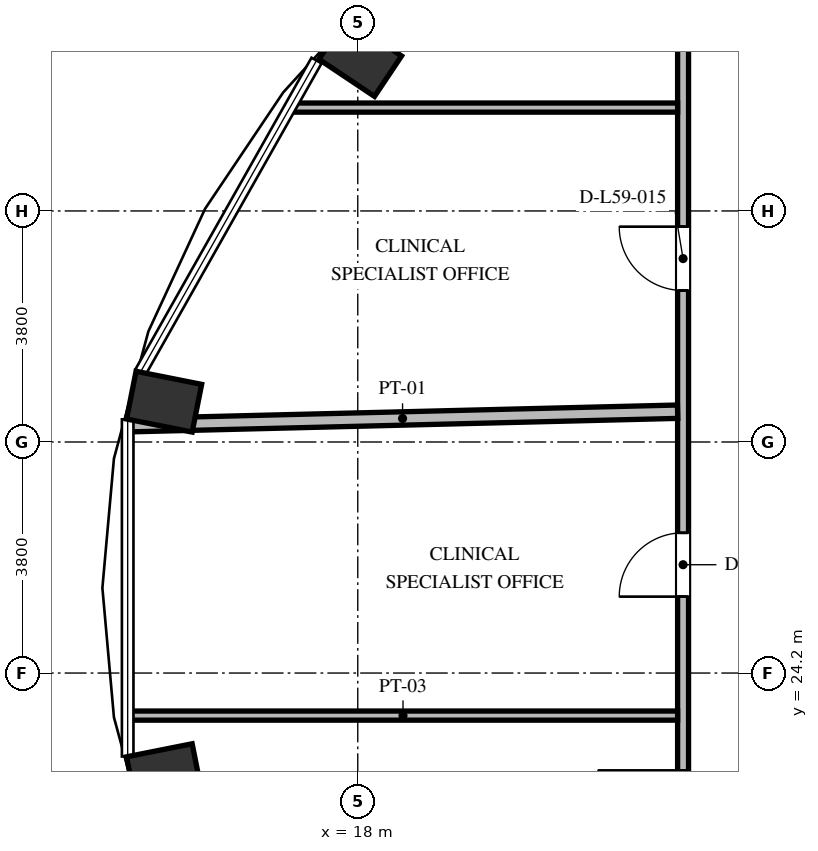
"""IFC4 building model, lengths in metres.
Left out: names, types, materials, properties, quantities, classifications, styles, units other than length and angle.
Written with IfcOpenShell. Run it as: python <this file> out.ifc"""

import sys

from ifc_helpers import new_model, si_unit, direction, frame, frame_2d, origin, origin_2d, place, context, subcontext, project, spatial, rectangle, extrude, element, fill, save


model = new_model("IFC4")
c1 = context("Model", 3, precision=1e-05, world=origin(), true_north=direction((0.0, 1.0)))
c2 = subcontext(c1, "Body", "Model", "MODEL_VIEW")
j1 = project(units=[si_unit("LENGTHUNIT", "METRE"), si_unit("PLANEANGLEUNIT", "RADIAN")], contexts=[c1])
p1 = place(None, origin())
s1 = spatial("IfcSite", under=j1, at=p1, CompositionType="ELEMENT")
p2 = place(p1, origin())
s2 = spatial("IfcBuilding", under=s1, at=p2, CompositionType="ELEMENT")
p3 = place(p2, frame((0.0, 0.0, 227.664)))
s3 = spatial("IfcBuildingStorey", under=s2, at=p3, CompositionType="ELEMENT", Elevation=227.664)
for number, where, z_axis, x_axis in (
    (1, (18.04, 34.323, 0.0), (0.0, 0.0, 1.0), (-0.831, 0.556, 0.0)),
    (2, (14.815, 28.663, 0.0), (0.0, 0.0, 1.0), (-0.981, 0.195, 0.0)),
    (3, (14.815, 22.537, 0.0), (0.0, 0.0, 1.0), (-0.981, -0.195, 0.0)),
):
    element("IfcColumn", number, at=place(p3, frame(where, z_axis=z_axis, x_axis=x_axis)), inside=s3, PredefinedType="COLUMN", context=c2, shape_type="SweptSolid", body=[
        extrude(rectangle(XDim=1.1, YDim=0.8, at=origin_2d()), origin(), (0.0, 0.0, 1.0), 3.648),
    ])
p4 = place(p3, frame((23.35, 19.98, 0.0), z_axis=(0.0, 0.0, 1.0), x_axis=(0.0, 1.0, 0.0)))
e4 = element("IfcWall", 4, at=p4, inside=s3, PredefinedType="PARTITIONING", context=c2, shape_type="SweptSolid", body=[
    extrude(rectangle(XDim=16.042, YDim=0.18, at=frame_2d((8.021, 0.0))), origin(), (0.0, 0.0, 1.0), 3.448),
])
p5 = place(p4, frame((5.477, 0.0, 0.0)))
e5 = element("IfcOpeningElement", 5, at=p5, cuts=e4, PredefinedType="OPENING", context=c2, shape_type="SweptSolid", body=[
    extrude(rectangle(XDim=1.05, YDim=2.15, at=frame_2d((0.525, 1.075))), frame((0.0, 0.1, 0.0), z_axis=(0.0, -1.0, 0.0), x_axis=(1.0, 0.0, 0.0)), (0.0, 0.0, 1.0), 0.2),
])
p6 = place(p4, frame((1.219, 0.0, 0.0)))
e6 = element("IfcOpeningElement", 6, at=p6, cuts=e4, PredefinedType="OPENING", context=c2, shape_type="SweptSolid", body=[
    extrude(rectangle(XDim=1.4, YDim=2.2, at=frame_2d((0.7, 1.1))), frame((0.0, 0.1, 0.0), z_axis=(0.0, -1.0, 0.0), x_axis=(1.0, 0.0, 0.0)), (0.0, 0.0, 1.0), 0.2),
])
p7 = place(p4, frame((10.511, 0.0, 0.0)))
e7 = element("IfcOpeningElement", 7, at=p7, cuts=e4, PredefinedType="OPENING", context=c2, shape_type="SweptSolid", body=[
    extrude(rectangle(XDim=1.05, YDim=2.15, at=frame_2d((0.525, 1.075))), frame((0.0, 0.1, 0.0), z_axis=(0.0, -1.0, 0.0), x_axis=(1.0, 0.0, 0.0)), (0.0, 0.0, 1.0), 0.2),
])
p8 = place(p3, frame((14.228, 23.5, 0.0), z_axis=(0.0, 0.0, 1.0), x_axis=(1.0, 0.0, 0.0)))
e8 = element("IfcWall", 8, at=p8, inside=s3, PredefinedType="PARTITIONING", context=c2, shape_type="SweptSolid", body=[
    extrude(rectangle(XDim=9.032, YDim=0.15, at=frame_2d((4.516, 0.0))), origin(), (0.0, 0.0, 1.0), 3.448),
])
p9 = place(p3, frame((14.213, 28.275, 0.0), z_axis=(0.0, 0.0, 1.0), x_axis=(0.99969661311, 0.024630910184, 0.0)))
e9 = element("IfcWall", 9, at=p9, inside=s3, PredefinedType="PARTITIONING", context=c2, shape_type="SweptSolid", body=[
    extrude(rectangle(XDim=9.05, YDim=0.22, at=frame_2d((4.525, 0.0))), origin(), (0.0, 0.0, 1.0), 3.448),
])
p10 = place(p3, frame((16.895, 33.5, 0.0), z_axis=(0.0, 0.0, 1.0), x_axis=(1.0, 0.0, 0.0)))
e10 = element("IfcWall", 10, at=p10, inside=s3, PredefinedType="PARTITIONING", context=c2, shape_type="SweptSolid", body=[
    extrude(rectangle(XDim=6.365, YDim=0.15, at=frame_2d((3.183, 0.0))), origin(), (0.0, 0.0, 1.0), 3.448),
])
p11 = place(p5, origin())
e11 = element("IfcDoor", 11, at=p11, inside=s3, OperationType="SINGLE_SWING_LEFT", PredefinedType="DOOR", context=c2, shape_type="SweptSolid", body=[
    extrude(rectangle(XDim=1.05, YDim=2.15, at=frame_2d((0.525, 1.075))), frame((0.0, 0.025, 0.0), z_axis=(0.0, -1.0, 0.0), x_axis=(1.0, 0.0, 0.0)), (0.0, 0.0, 1.0), 0.05),
])
fill(e5, e11)
p12 = place(p6, origin())
e12 = element("IfcDoor", 12, at=p12, inside=s3, OperationType="SINGLE_SWING_RIGHT", PredefinedType="DOOR", context=c2, shape_type="SweptSolid", body=[
    extrude(rectangle(XDim=1.4, YDim=2.2, at=frame_2d((0.7, 1.1))), frame((0.0, 0.025, 0.0), z_axis=(0.0, -1.0, 0.0), x_axis=(1.0, 0.0, 0.0)), (0.0, 0.0, 1.0), 0.05),
])
fill(e6, e12)
p13 = place(p7, origin())
e13 = element("IfcDoor", 13, at=p13, inside=s3, OperationType="SINGLE_SWING_RIGHT", PredefinedType="DOOR", context=c2, shape_type="SweptSolid", body=[
    extrude(rectangle(XDim=1.05, YDim=2.15, at=frame_2d((0.525, 1.075))), frame((0.0, 0.025, 0.0), z_axis=(0.0, -1.0, 0.0), x_axis=(1.0, 0.0, 0.0)), (0.0, 0.0, 1.0), 0.05),
])
fill(e7, e13)
save(model, sys.argv[1])
